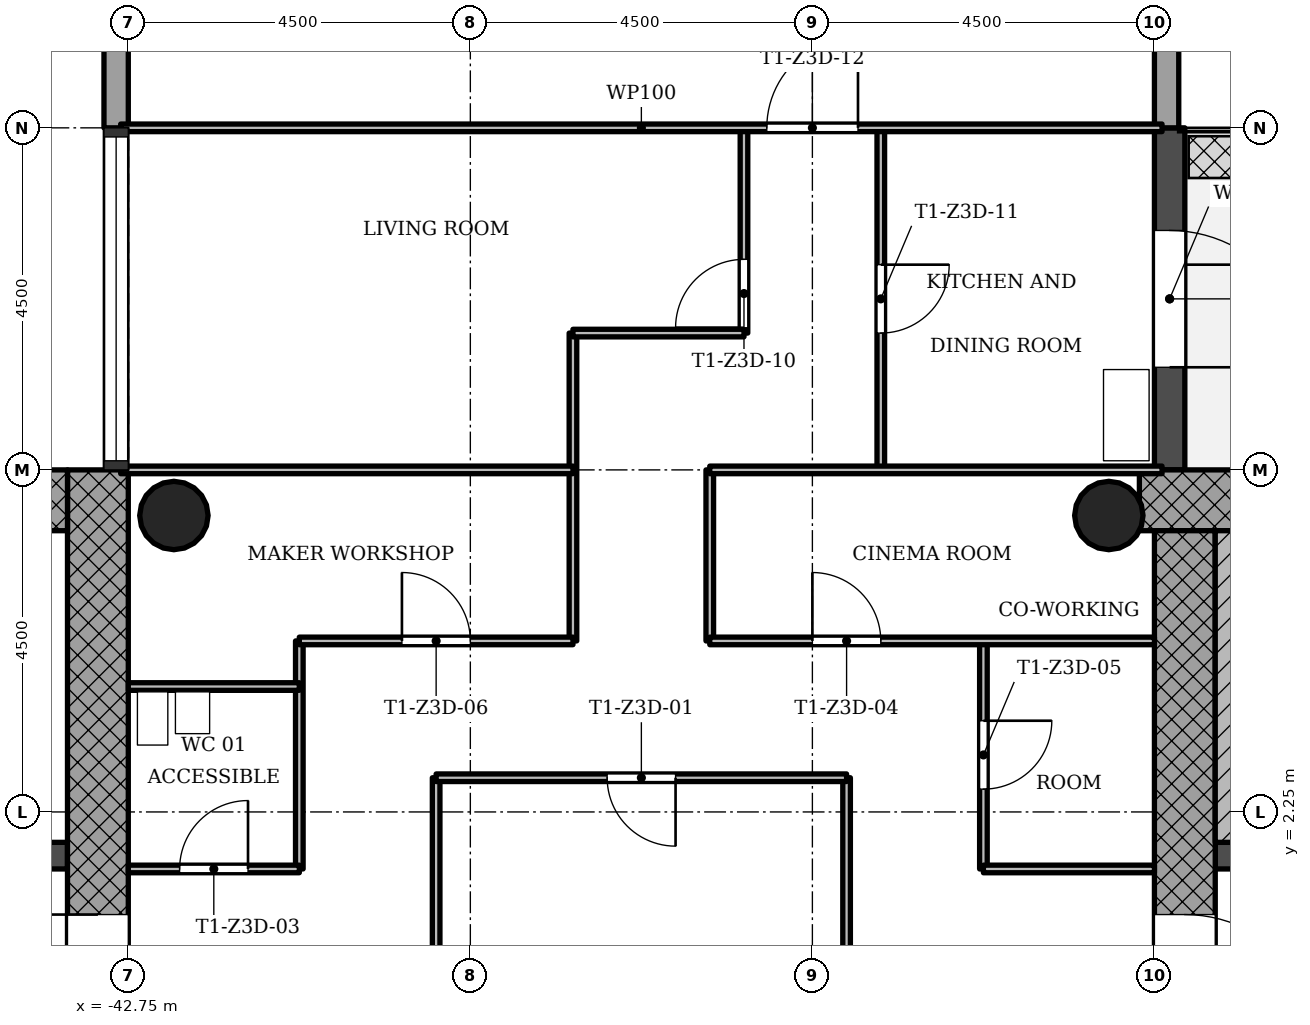
"""IFC4 building model, lengths in metres.
Left out: names, types, materials, properties, quantities, classifications, styles, units other than length and angle.
Written with IfcOpenShell. Run it as: python <this file> out.ifc"""

import sys

from ifc_helpers import new_model, si_unit, direction, frame, frame_2d, origin, origin_2d, place, context, subcontext, project, spatial, rectangle, hollow_circle, extrude, element, fill, save


model = new_model("IFC4")
c1 = context("Model", 3, precision=1e-05, world=origin(), true_north=direction((0.0, 1.0)))
c2 = subcontext(c1, "Body", "Model", "MODEL_VIEW")
j1 = project(units=[si_unit("LENGTHUNIT", "METRE"), si_unit("PLANEANGLEUNIT", "RADIAN")], contexts=[c1])
p1 = place(None, origin())
s1 = spatial("IfcSite", under=j1, at=p1, CompositionType="ELEMENT")
p2 = place(p1, origin())
s2 = spatial("IfcBuilding", under=s1, at=p2, CompositionType="ELEMENT")
p3 = place(p2, frame((0.0, 0.0, 174.5)))
s3 = spatial("IfcBuildingStorey", under=s2, at=p3, CompositionType="ELEMENT", Elevation=174.5)
p4 = place(p3, frame((-20.652, 6.35, 0.0), z_axis=(0.0, 0.0, 1.0), x_axis=(-1.0, 0.0, 0.0)))
e1 = element("IfcWall", 1, at=p4, inside=s3, PredefinedType="SHEAR", context=c2, shape_type="SweptSolid", body=[
    extrude(rectangle(XDim=8.796, YDim=0.8, at=frame_2d((4.398, 0.0))), origin(), (0.0, 0.0, 1.0), 3.4),
])
p5 = place(p3, frame((-28.85, 5.95, 0.0), z_axis=(0.0, 0.0, 1.0), x_axis=(0.0, -1.0, 0.0)))
e2 = element("IfcWall", 2, at=p5, inside=s3, PredefinedType="SHEAR", context=c2, shape_type="SweptSolid", body=[
    extrude(rectangle(XDim=12.7, YDim=0.8, at=frame_2d((6.35, 0.0))), origin(), (0.0, 0.0, 1.0), 3.4),
])
p6 = place(p5, frame((5.05, 0.0, 0.0)))
e3 = element("IfcOpeningElement", 3, at=p6, cuts=e2, PredefinedType="OPENING", context=c2, shape_type="SweptSolid", body=[
    extrude(rectangle(XDim=1.8, YDim=2.1, at=frame_2d((0.9, 1.05))), frame((0.0, 0.41, 0.0), z_axis=(0.0, -1.0, 0.0), x_axis=(1.0, 0.0, 0.0)), (0.0, 0.0, 1.0), 0.82),
])
p7 = place(p3, frame((-28.45, 1.675, 0.0), z_axis=(0.0, 0.0, 1.0), x_axis=(1.0, 0.0, 0.0)))
e4 = element("IfcWall", 4, at=p7, inside=s3, PredefinedType="SHEAR", context=c2, shape_type="SweptSolid", body=[
    extrude(rectangle(XDim=7.4, YDim=0.35, at=frame_2d((3.7, 0.0))), origin(), (0.0, 0.0, 1.0), 3.4),
])
p8 = place(p7, frame((0.85, 0.0, 0.0)))
e5 = element("IfcOpeningElement", 5, at=p8, cuts=e4, PredefinedType="OPENING", context=c2, shape_type="SweptSolid", body=[
    extrude(rectangle(XDim=0.9, YDim=2.1, at=frame_2d((0.45, 1.05))), frame((0.0, 0.185, 0.0), z_axis=(0.0, -1.0, 0.0), x_axis=(1.0, 0.0, 0.0)), (0.0, 0.0, 1.0), 0.37),
])
p9 = place(p3, frame((-43.15, -5.95, 0.0), z_axis=(0.0, 0.0, 1.0), x_axis=(0.0, 1.0, 0.0)))
e6 = element("IfcWall", 6, at=p9, inside=s3, PredefinedType="SHEAR", context=c2, shape_type="SweptSolid", body=[
    extrude(rectangle(XDim=12.7, YDim=0.8, at=frame_2d((6.35, 0.0))), origin(), (0.0, 0.0, 1.0), 3.4),
])
p10 = place(p9, frame((5.05, 0.0, 0.0)))
e7 = element("IfcOpeningElement", 7, at=p10, cuts=e6, PredefinedType="OPENING", context=c2, shape_type="SweptSolid", body=[
    extrude(rectangle(XDim=1.8, YDim=2.1, at=frame_2d((0.9, 1.05))), frame((0.0, 0.41, 0.0), z_axis=(0.0, -1.0, 0.0), x_axis=(1.0, 0.0, 0.0)), (0.0, 0.0, 1.0), 0.82),
])
p11 = place(p3, frame((-43.55, 6.35, 0.0), z_axis=(0.0, 0.0, 1.0), x_axis=(-1.0, 0.0, 0.0)))
e8 = element("IfcWall", 8, at=p11, inside=s3, PredefinedType="SHEAR", context=c2, shape_type="SweptSolid", body=[
    extrude(rectangle(XDim=8.2, YDim=0.8, at=frame_2d((4.1, 0.0))), origin(), (0.0, 0.0, 1.0), 3.4),
])
p12 = place(p3, frame((-50.95, 1.675, 0.0), z_axis=(0.0, 0.0, 1.0), x_axis=(1.0, 0.0, 0.0)))
e9 = element("IfcWall", 9, at=p12, inside=s3, PredefinedType="SHEAR", context=c2, shape_type="SweptSolid", body=[
    extrude(rectangle(XDim=7.4, YDim=0.35, at=frame_2d((3.7, 0.0))), origin(), (0.0, 0.0, 1.0), 3.4),
])
p13 = place(p12, frame((5.35, 0.0, 0.0)))
e10 = element("IfcOpeningElement", 10, at=p13, cuts=e9, PredefinedType="OPENING", context=c2, shape_type="SweptSolid", body=[
    extrude(rectangle(XDim=1.1, YDim=2.1, at=frame_2d((0.55, 1.05))), frame((0.0, 0.185, 0.0), z_axis=(0.0, -1.0, 0.0), x_axis=(1.0, 0.0, 0.0)), (0.0, 0.0, 1.0), 0.37),
])
p14 = place(p12, frame((1.0, 0.0, 0.0)))
e11 = element("IfcOpeningElement", 11, at=p14, cuts=e9, PredefinedType="OPENING", context=c2, shape_type="SweptSolid", body=[
    extrude(rectangle(XDim=1.1, YDim=2.1, at=frame_2d((0.55, 1.05))), frame((0.0, 0.185, 0.0), z_axis=(0.0, -1.0, 0.0), x_axis=(1.0, 0.0, 0.0)), (0.0, 0.0, 1.0), 0.37),
])
p15 = place(p12, frame((3.3, 0.0, 0.0)))
e12 = element("IfcOpeningElement", 12, at=p15, cuts=e9, PredefinedType="OPENING", context=c2, shape_type="SweptSolid", body=[
    extrude(rectangle(XDim=0.9, YDim=2.1, at=frame_2d((0.45, 1.05))), frame((0.0, 0.185, 0.0), z_axis=(0.0, -1.0, 0.0), x_axis=(1.0, 0.0, 0.0)), (0.0, 0.0, 1.0), 0.37),
])
for number, where, z_axis, x_axis in (
    (13, (-29.85, 6.15, 0.0), (0.0, 0.0, 1.0), (1.0, 0.0, 0.0)),
    (14, (-42.15, 6.15, 0.0), (0.0, 0.0, 1.0), (1.0, 0.0, 0.0)),
):
    element("IfcColumn", number, at=place(p3, frame(where, z_axis=z_axis, x_axis=x_axis)), inside=s3, PredefinedType="COLUMN", context=c2, shape_type="SweptSolid", body=[
        extrude(hollow_circle(Radius=0.45, WallThickness=0.032, at=origin_2d()), origin(), (0.0, 0.0, 1.0), 3.4),
    ])
p16 = place(p3, frame((-29.05, 6.75, -0.02), z_axis=(0.0, 0.0, 1.0), x_axis=(0.0, 1.0, 0.0)))
e15 = element("IfcWall", 15, at=p16, inside=s3, PredefinedType="STANDARD", context=c2, shape_type="SweptSolid", body=[
    extrude(rectangle(XDim=4.5, YDim=0.4, at=frame_2d((2.25, 0.0))), origin(), (0.0, 0.0, 1.0), 3.12),
])
p17 = place(p16, frame((1.35, 0.0, 0.02)))
e16 = element("IfcOpeningElement", 16, at=p17, cuts=e15, PredefinedType="OPENING", context=c2, shape_type="SweptSolid", body=[
    extrude(rectangle(XDim=1.8, YDim=2.1, at=frame_2d((0.9, 1.05))), frame((0.0, 0.21, 0.0), z_axis=(0.0, -1.0, 0.0), x_axis=(1.0, 0.0, 0.0)), (0.0, 0.0, 1.0), 0.42),
])
p18 = place(p3, frame((-29.09, 11.25, -0.3), z_axis=(0.0, 0.0, 1.0), x_axis=(0.0, 1.0, 0.0)))
e17 = element("IfcWall", 17, at=p18, inside=s3, PredefinedType="STANDARD", context=c2, shape_type="SweptSolid", body=[
    extrude(rectangle(XDim=1.82, YDim=0.32, at=frame_2d((0.91, 0.0))), origin(), (0.0, 0.0, 1.0), 3.4),
])
p19 = place(p3, frame((-42.91, 12.75, -0.3), z_axis=(0.0, 0.0, 1.0), x_axis=(0.0, -1.0, 0.0)))
e18 = element("IfcWall", 18, at=p19, inside=s3, PredefinedType="STANDARD", context=c2, shape_type="SweptSolid", body=[
    extrude(rectangle(XDim=1.5, YDim=0.32, at=frame_2d((0.75, 0.0))), origin(), (0.0, 0.0, 1.0), 3.4),
])
p20 = place(p3, frame((-40.5, 1.5, 0.0), z_axis=(0.0, 0.0, 1.0), x_axis=(0.0, 1.0, 0.0)))
e19 = element("IfcWall", 19, at=p20, inside=s3, PredefinedType="PARTITIONING", context=c2, shape_type="SweptSolid", body=[
    extrude(rectangle(XDim=3.0, YDim=0.1, at=frame_2d((1.5, 0.0))), origin(), (0.0, 0.0, 1.0), 3.0),
])
p21 = place(p3, frame((-38.7, -2.7, 0.0), z_axis=(0.0, 0.0, 1.0), x_axis=(0.0, 1.0, 0.0)))
e20 = element("IfcWall", 20, at=p21, inside=s3, PredefinedType="PARTITIONING", context=c2, shape_type="SweptSolid", body=[
    extrude(rectangle(XDim=5.4, YDim=0.1, at=frame_2d((2.7, 0.0))), origin(), (0.0, 0.0, 1.0), 3.0),
])
p22 = place(p3, frame((-36.9, 4.5, 0.0), z_axis=(0.0, 0.0, 1.0), x_axis=(0.0, 1.0, 0.0)))
e21 = element("IfcWall", 21, at=p22, inside=s3, PredefinedType="PARTITIONING", context=c2, shape_type="SweptSolid", body=[
    extrude(rectangle(XDim=4.05, YDim=0.1, at=frame_2d((2.025, 0.0))), origin(), (0.0, 0.0, 1.0), 3.0),
])
p23 = place(p3, frame((-35.1, 4.5, 0.0), z_axis=(0.0, 0.0, 1.0), x_axis=(0.0, 1.0, 0.0)))
e22 = element("IfcWall", 22, at=p23, inside=s3, PredefinedType="PARTITIONING", context=c2, shape_type="SweptSolid", body=[
    extrude(rectangle(XDim=2.25, YDim=0.1, at=frame_2d((1.125, 0.0))), origin(), (0.0, 0.0, 1.0), 3.0),
])
p24 = place(p3, frame((-34.65, 8.55, 0.0), z_axis=(0.0, 0.0, 1.0), x_axis=(0.0, 1.0, 0.0)))
e23 = element("IfcWall", 23, at=p24, inside=s3, PredefinedType="PARTITIONING", context=c2, shape_type="SweptSolid", body=[
    extrude(rectangle(XDim=2.7, YDim=0.1, at=frame_2d((1.35, 0.0))), origin(), (0.0, 0.0, 1.0), 3.0),
])
p25 = place(p24, frame((0.07, 0.0, 0.0)))
e24 = element("IfcOpeningElement", 24, at=p25, cuts=e23, PredefinedType="OPENING", context=c2, shape_type="SweptSolid", body=[
    extrude(rectangle(XDim=0.9, YDim=2.1, at=frame_2d((0.45, 1.05))), frame((0.0, 0.06, 0.0), z_axis=(0.0, -1.0, 0.0), x_axis=(1.0, 0.0, 0.0)), (0.0, 0.0, 1.0), 0.12),
])
p26 = place(p3, frame((-33.3, -2.7, 0.0), z_axis=(0.0, 0.0, 1.0), x_axis=(0.0, 1.0, 0.0)))
e25 = element("IfcWall", 25, at=p26, inside=s3, PredefinedType="PARTITIONING", context=c2, shape_type="SweptSolid", body=[
    extrude(rectangle(XDim=5.4, YDim=0.1, at=frame_2d((2.7, 0.0))), origin(), (0.0, 0.0, 1.0), 3.0),
])
p27 = place(p26, frame((2.25, 0.0, 0.0)))
e26 = element("IfcOpeningElement", 26, at=p27, cuts=e25, PredefinedType="OPENING", context=c2, shape_type="SweptSolid", body=[
    extrude(rectangle(XDim=0.9, YDim=2.1, at=frame_2d((0.45, 1.05))), frame((0.0, 0.06, 0.0), z_axis=(0.0, -1.0, 0.0), x_axis=(1.0, 0.0, 0.0)), (0.0, 0.0, 1.0), 0.12),
])
p28 = place(p3, frame((-32.85, 6.75, 0.0), z_axis=(0.0, 0.0, 1.0), x_axis=(0.0, 1.0, 0.0)))
e27 = element("IfcWall", 27, at=p28, inside=s3, PredefinedType="PARTITIONING", context=c2, shape_type="SweptSolid", body=[
    extrude(rectangle(XDim=4.5, YDim=0.1, at=frame_2d((2.25, 0.0))), origin(), (0.0, 0.0, 1.0), 3.0),
])
p29 = place(p28, frame((1.8, 0.0, 0.0)))
e28 = element("IfcOpeningElement", 28, at=p29, cuts=e27, PredefinedType="OPENING", context=c2, shape_type="SweptSolid", body=[
    extrude(rectangle(XDim=0.9, YDim=2.1, at=frame_2d((0.45, 1.05))), frame((0.0, 0.06, 0.0), z_axis=(0.0, -1.0, 0.0), x_axis=(1.0, 0.0, 0.0)), (0.0, 0.0, 1.0), 0.12),
])
p30 = place(p3, frame((-31.5, 1.5, 0.0), z_axis=(0.0, 0.0, 1.0), x_axis=(0.0, 1.0, 0.0)))
e29 = element("IfcWall", 29, at=p30, inside=s3, PredefinedType="PARTITIONING", context=c2, shape_type="SweptSolid", body=[
    extrude(rectangle(XDim=3.0, YDim=0.1, at=frame_2d((1.5, 0.0))), origin(), (0.0, 0.0, 1.0), 3.0),
])
p31 = place(p30, frame((1.05, 0.0, 0.0)))
e30 = element("IfcOpeningElement", 30, at=p31, cuts=e29, PredefinedType="OPENING", context=c2, shape_type="SweptSolid", body=[
    extrude(rectangle(XDim=0.9, YDim=2.1, at=frame_2d((0.45, 1.05))), frame((0.0, 0.06, 0.0), z_axis=(0.0, -1.0, 0.0), x_axis=(1.0, 0.0, 0.0)), (0.0, 0.0, 1.0), 0.12),
])
p32 = place(p3, frame((-42.75, 1.5, 0.0), z_axis=(0.0, 0.0, 1.0), x_axis=(1.0, 0.0, 0.0)))
e31 = element("IfcWall", 31, at=p32, inside=s3, PredefinedType="PARTITIONING", context=c2, shape_type="SweptSolid", body=[
    extrude(rectangle(XDim=2.25, YDim=0.1, at=frame_2d((1.125, 0.0))), origin(), (0.0, 0.0, 1.0), 3.0),
])
p33 = place(p32, frame((0.675, 0.0, 0.0)))
e32 = element("IfcOpeningElement", 32, at=p33, cuts=e31, PredefinedType="OPENING", context=c2, shape_type="SweptSolid", body=[
    extrude(rectangle(XDim=0.9, YDim=2.1, at=frame_2d((0.45, 1.05))), frame((0.0, 0.06, 0.0), z_axis=(0.0, -1.0, 0.0), x_axis=(1.0, 0.0, 0.0)), (0.0, 0.0, 1.0), 0.12),
])
p34 = place(p3, frame((-31.5, 1.5, 0.0), z_axis=(0.0, 0.0, 1.0), x_axis=(1.0, 0.0, 0.0)))
e33 = element("IfcWall", 33, at=p34, inside=s3, PredefinedType="PARTITIONING", context=c2, shape_type="SweptSolid", body=[
    extrude(rectangle(XDim=2.25, YDim=0.1, at=frame_2d((1.125, 0.0))), origin(), (0.0, 0.0, 1.0), 3.0),
])
p35 = place(p3, frame((-38.7, 2.7, 0.0), z_axis=(0.0, 0.0, 1.0), x_axis=(1.0, 0.0, 0.0)))
e34 = element("IfcWall", 34, at=p35, inside=s3, PredefinedType="PARTITIONING", context=c2, shape_type="SweptSolid", body=[
    extrude(rectangle(XDim=5.4, YDim=0.1, at=frame_2d((2.7, 0.0))), origin(), (0.0, 0.0, 1.0), 3.0),
])
p36 = place(p35, frame((2.25, 0.0, 0.0)))
e35 = element("IfcOpeningElement", 35, at=p36, cuts=e34, PredefinedType="OPENING", context=c2, shape_type="SweptSolid", body=[
    extrude(rectangle(XDim=0.9, YDim=2.1, at=frame_2d((0.45, 1.05))), frame((0.0, 0.06, 0.0), z_axis=(0.0, -1.0, 0.0), x_axis=(1.0, 0.0, 0.0)), (0.0, 0.0, 1.0), 0.12),
])
p37 = place(p3, frame((-42.75, 3.9, 0.0), z_axis=(0.0, 0.0, 1.0), x_axis=(1.0, 0.0, 0.0)))
e36 = element("IfcWall", 36, at=p37, inside=s3, PredefinedType="PARTITIONING", context=c2, shape_type="SweptSolid", body=[
    extrude(rectangle(XDim=2.25, YDim=0.1, at=frame_2d((1.125, 0.0))), origin(), (0.0, 0.0, 1.0), 3.0),
])
p38 = place(p3, frame((-40.5, 4.5, 0.0), z_axis=(0.0, 0.0, 1.0), x_axis=(1.0, 0.0, 0.0)))
e37 = element("IfcWall", 37, at=p38, inside=s3, PredefinedType="PARTITIONING", context=c2, shape_type="SweptSolid", body=[
    extrude(rectangle(XDim=3.6, YDim=0.1, at=frame_2d((1.8, 0.0))), origin(), (0.0, 0.0, 1.0), 3.0),
])
p39 = place(p38, frame((1.35, 0.0, 0.0)))
e38 = element("IfcOpeningElement", 38, at=p39, cuts=e37, PredefinedType="OPENING", context=c2, shape_type="SweptSolid", body=[
    extrude(rectangle(XDim=0.9, YDim=2.1, at=frame_2d((0.45, 1.05))), frame((0.0, 0.06, 0.0), z_axis=(0.0, -1.0, 0.0), x_axis=(1.0, 0.0, 0.0)), (0.0, 0.0, 1.0), 0.12),
])
p40 = place(p3, frame((-35.1, 4.5, 0.0), z_axis=(0.0, 0.0, 1.0), x_axis=(1.0, 0.0, 0.0)))
e39 = element("IfcWall", 39, at=p40, inside=s3, PredefinedType="PARTITIONING", context=c2, shape_type="SweptSolid", body=[
    extrude(rectangle(XDim=5.85, YDim=0.1, at=frame_2d((2.925, 0.0))), origin(), (0.0, 0.0, 1.0), 3.0),
])
p41 = place(p40, frame((1.35, 0.0, 0.0)))
e40 = element("IfcOpeningElement", 40, at=p41, cuts=e39, PredefinedType="OPENING", context=c2, shape_type="SweptSolid", body=[
    extrude(rectangle(XDim=0.9, YDim=2.1, at=frame_2d((0.45, 1.05))), frame((0.0, 0.06, 0.0), z_axis=(0.0, -1.0, 0.0), x_axis=(1.0, 0.0, 0.0)), (0.0, 0.0, 1.0), 0.12),
])
for number, where, z_axis, x_axis in (
    (41, (-42.85, 6.75, 0.0), (0.0, 0.0, 1.0), (1.0, 0.0, 0.0)),
    (42, (-35.1, 6.75, 0.0), (0.0, 0.0, 1.0), (1.0, 0.0, 0.0)),
):
    element("IfcWall", number, at=place(p3, frame(where, z_axis=z_axis, x_axis=x_axis)), inside=s3, PredefinedType="PARTITIONING", context=c2, shape_type="SweptSolid", body=[
        extrude(rectangle(XDim=5.95, YDim=0.1, at=frame_2d((2.975, 0.0))), origin(), (0.0, 0.0, 1.0), 3.0),
    ])
p42 = place(p3, frame((-36.9, 8.55, 0.0), z_axis=(0.0, 0.0, 1.0), x_axis=(1.0, 0.0, 0.0)))
e43 = element("IfcWall", 43, at=p42, inside=s3, PredefinedType="PARTITIONING", context=c2, shape_type="SweptSolid", body=[
    extrude(rectangle(XDim=2.25, YDim=0.1, at=frame_2d((1.125, 0.0))), origin(), (0.0, 0.0, 1.0), 3.0),
])
p43 = place(p3, frame((-42.85, 11.25, 0.0), z_axis=(0.0, 0.0, 1.0), x_axis=(1.0, 0.0, 0.0)))
e44 = element("IfcWall", 44, at=p43, inside=s3, PredefinedType="PARTITIONING", context=c2, shape_type="SweptSolid", body=[
    extrude(rectangle(XDim=13.7, YDim=0.1, at=frame_2d((6.85, 0.0))), origin(), (0.0, 0.0, 1.0), 3.0),
])
p44 = place(p43, frame((8.5, 0.0, 0.0)))
e45 = element("IfcOpeningElement", 45, at=p44, cuts=e44, PredefinedType="OPENING", context=c2, shape_type="SweptSolid", body=[
    extrude(rectangle(XDim=1.2, YDim=2.1, at=frame_2d((0.6, 1.05))), frame((0.0, 0.06, 0.0), z_axis=(0.0, -1.0, 0.0), x_axis=(1.0, 0.0, 0.0)), (0.0, 0.0, 1.0), 0.12),
])
p45 = place(p3, frame((-28.25, 1.85, 0.0), z_axis=(0.0, 0.0, 1.0), x_axis=(0.0, 1.0, 0.0)))
e46 = element("IfcWall", 46, at=p45, inside=s3, PredefinedType="SHEAR", context=c2, shape_type="SweptSolid", body=[
    extrude(rectangle(XDim=4.1, YDim=0.4, at=frame_2d((2.05, 0.0))), origin(), (0.0, 0.0, 1.0), 3.4),
])
p46 = place(p17, origin())
e47 = element("IfcDoor", 47, at=p46, inside=s3, OperationType="SINGLE_SWING_LEFT", PredefinedType="DOOR", context=c2, shape_type="SweptSolid", body=[
    extrude(rectangle(XDim=1.8, YDim=2.1, at=frame_2d((0.9, 1.05))), frame((0.0, 0.025, 0.0), z_axis=(0.0, -1.0, 0.0), x_axis=(1.0, 0.0, 0.0)), (0.0, 0.0, 1.0), 0.05),
])
fill(e16, e47)
p47 = place(p36, origin())
e48 = element("IfcDoor", 48, at=p47, inside=s3, OperationType="SINGLE_SWING_RIGHT", PredefinedType="DOOR", context=c2, shape_type="SweptSolid", body=[
    extrude(rectangle(XDim=0.9, YDim=2.1, at=frame_2d((0.45, 1.05))), frame((0.0, 0.025, 0.0), z_axis=(0.0, -1.0, 0.0), x_axis=(1.0, 0.0, 0.0)), (0.0, 0.0, 1.0), 0.05),
])
fill(e35, e48)
p48 = place(p33, origin())
e49 = element("IfcDoor", 49, at=p48, inside=s3, OperationType="SINGLE_SWING_LEFT", PredefinedType="DOOR", context=c2, shape_type="SweptSolid", body=[
    extrude(rectangle(XDim=0.9, YDim=2.1, at=frame_2d((0.45, 1.05))), frame((0.0, 0.025, 0.0), z_axis=(0.0, -1.0, 0.0), x_axis=(1.0, 0.0, 0.0)), (0.0, 0.0, 1.0), 0.05),
])
fill(e32, e49)
p49 = place(p41, origin())
e50 = element("IfcDoor", 50, at=p49, inside=s3, OperationType="SINGLE_SWING_RIGHT", PredefinedType="DOOR", context=c2, shape_type="SweptSolid", body=[
    extrude(rectangle(XDim=0.9, YDim=2.1, at=frame_2d((0.45, 1.05))), frame((0.0, 0.025, 0.0), z_axis=(0.0, -1.0, 0.0), x_axis=(1.0, 0.0, 0.0)), (0.0, 0.0, 1.0), 0.05),
])
fill(e40, e50)
p50 = place(p31, origin())
e51 = element("IfcDoor", 51, at=p50, inside=s3, OperationType="SINGLE_SWING_RIGHT", PredefinedType="DOOR", context=c2, shape_type="SweptSolid", body=[
    extrude(rectangle(XDim=0.9, YDim=2.1, at=frame_2d((0.45, 1.05))), frame((0.0, 0.025, 0.0), z_axis=(0.0, -1.0, 0.0), x_axis=(1.0, 0.0, 0.0)), (0.0, 0.0, 1.0), 0.05),
])
fill(e30, e51)
p51 = place(p39, origin())
e52 = element("IfcDoor", 52, at=p51, inside=s3, OperationType="SINGLE_SWING_RIGHT", PredefinedType="DOOR", context=c2, shape_type="SweptSolid", body=[
    extrude(rectangle(XDim=0.9, YDim=2.1, at=frame_2d((0.45, 1.05))), frame((0.0, 0.025, 0.0), z_axis=(0.0, -1.0, 0.0), x_axis=(1.0, 0.0, 0.0)), (0.0, 0.0, 1.0), 0.05),
])
fill(e38, e52)
p52 = place(p25, origin())
e53 = element("IfcDoor", 53, at=p52, inside=s3, OperationType="SINGLE_SWING_RIGHT", PredefinedType="DOOR", context=c2, shape_type="SweptSolid", body=[
    extrude(rectangle(XDim=0.9, YDim=2.1, at=frame_2d((0.45, 1.05))), frame((0.0, 0.025, 0.0), z_axis=(0.0, -1.0, 0.0), x_axis=(1.0, 0.0, 0.0)), (0.0, 0.0, 1.0), 0.05),
])
fill(e24, e53)
p53 = place(p29, origin())
e54 = element("IfcDoor", 54, at=p53, inside=s3, OperationType="SINGLE_SWING_RIGHT", PredefinedType="DOOR", context=c2, shape_type="SweptSolid", body=[
    extrude(rectangle(XDim=0.9, YDim=2.1, at=frame_2d((0.45, 1.05))), frame((0.0, 0.025, 0.0), z_axis=(0.0, -1.0, 0.0), x_axis=(1.0, 0.0, 0.0)), (0.0, 0.0, 1.0), 0.05),
])
fill(e28, e54)
p54 = place(p44, origin())
e55 = element("IfcDoor", 55, at=p54, inside=s3, OperationType="SINGLE_SWING_LEFT", PredefinedType="DOOR", context=c2, shape_type="SweptSolid", body=[
    extrude(rectangle(XDim=1.2, YDim=2.1, at=frame_2d((0.6, 1.05))), frame((0.0, 0.025, 0.0), z_axis=(0.0, -1.0, 0.0), x_axis=(1.0, 0.0, 0.0)), (0.0, 0.0, 1.0), 0.05),
])
fill(e45, e55)
p55 = place(p6, origin())
e56 = element("IfcDoor", 56, at=p55, inside=s3, OperationType="SINGLE_SWING_LEFT", PredefinedType="DOOR", context=c2, shape_type="SweptSolid", body=[
    extrude(rectangle(XDim=1.8, YDim=2.1, at=frame_2d((0.9, 1.05))), frame((0.0, 0.025, 0.0), z_axis=(0.0, -1.0, 0.0), x_axis=(1.0, 0.0, 0.0)), (0.0, 0.0, 1.0), 0.05),
])
fill(e3, e56)
p56 = place(p10, origin())
e57 = element("IfcDoor", 57, at=p56, inside=s3, OperationType="SINGLE_SWING_LEFT", PredefinedType="DOOR", context=c2, shape_type="SweptSolid", body=[
    extrude(rectangle(XDim=1.8, YDim=2.1, at=frame_2d((0.9, 1.05))), frame((0.0, 0.025, 0.0), z_axis=(0.0, -1.0, 0.0), x_axis=(1.0, 0.0, 0.0)), (0.0, 0.0, 1.0), 0.05),
])
fill(e7, e57)
save(model, sys.argv[1])
